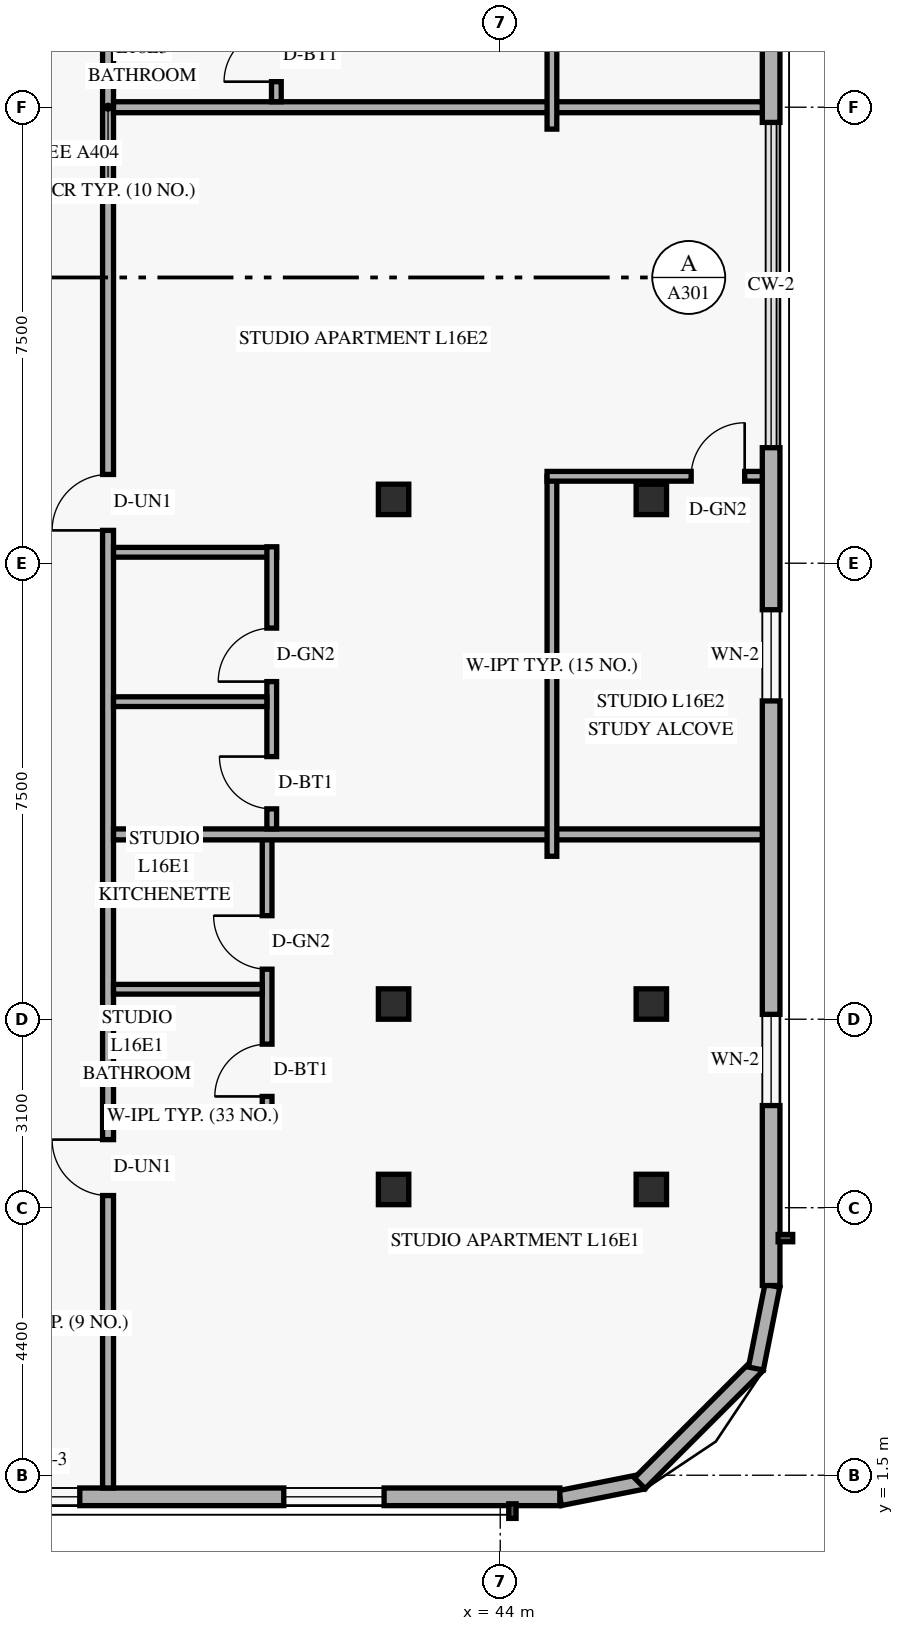
"""IFC4 building model, lengths in metres.
Left out: names, types, materials, properties, quantities, classifications, styles, units other than length and angle.
Written with IfcOpenShell. Run it as: python <this file> out.ifc"""

import sys

from ifc_helpers import new_model, si_unit, direction, frame, frame_2d, origin, origin_2d, place, context, subcontext, project, spatial, rectangle, hollow_rectangle, extrude, element, fill, save


model = new_model("IFC4")
c1 = context("Model", 3, precision=1e-05, world=origin(), true_north=direction((0.0, 1.0)))
c2 = subcontext(c1, "Body", "Model", "MODEL_VIEW")
j1 = project(units=[si_unit("LENGTHUNIT", "METRE"), si_unit("PLANEANGLEUNIT", "RADIAN")], contexts=[c1])
p1 = place(None, origin())
s1 = spatial("IfcSite", under=j1, at=p1, CompositionType="ELEMENT")
p2 = place(p1, origin())
s2 = spatial("IfcBuilding", under=s1, at=p2, CompositionType="ELEMENT")
p3 = place(p2, frame((0.0, 0.0, 64.2)))
s3 = spatial("IfcBuildingStorey", under=s2, at=p3, CompositionType="ELEMENT", Elevation=64.2)
for number, where, z_axis, x_axis in (
    (1, (42.183, 6.2, 0.0), (0.035, 0.0, 0.999), (0.0, 1.0, 0.0)),
    (2, (42.183, 9.25, 0.0), (0.035, 0.0, 0.999), (0.0, 1.0, 0.0)),
    (3, (42.183, 17.55, 0.0), (0.035, 0.0, 0.999), (0.0, 1.0, 0.0)),
):
    element("IfcColumn", number, at=place(p3, frame(where, z_axis=z_axis, x_axis=x_axis)), inside=s3, PredefinedType="COLUMN", context=c2, shape_type="SweptSolid", body=[
        extrude(hollow_rectangle(XDim=0.5, YDim=0.5, WallThickness=0.022, at=origin_2d()), origin(), (0.0, 0.0, 1.0), 3.602),
    ])
for number, where, z_axis, x_axis in (
    (4, (46.38, 6.2, 0.0), (0.058, 0.0, 0.998), (0.0, 1.0, 0.0)),
    (5, (46.38, 9.25, 0.0), (0.058, 0.0, 0.998), (0.0, 1.0, 0.0)),
    (6, (46.38, 17.55, 0.0), (0.058, 0.0, 0.998), (0.0, 1.0, 0.0)),
):
    element("IfcColumn", number, at=place(p3, frame(where, z_axis=z_axis, x_axis=x_axis)), inside=s3, PredefinedType="COLUMN", context=c2, shape_type="SweptSolid", body=[
        extrude(hollow_rectangle(XDim=0.5, YDim=0.5, WallThickness=0.022, at=origin_2d()), origin(), (0.0, 0.0, 1.0), 3.606),
    ])
p4 = place(p3, frame((44.983, 1.124, 0.0), z_axis=(0.0, 0.0, 1.0), x_axis=(0.980809899341, 0.19496651342, 0.0)))
e7 = element("IfcWall", 7, at=p4, inside=s3, PredefinedType="SOLIDWALL", context=c2, shape_type="SweptSolid", body=[
    extrude(rectangle(XDim=1.389, YDim=0.25, at=frame_2d((0.694, 0.0))), origin(), (0.0, 0.0, 1.0), 3.36),
])
p5 = place(p3, frame((46.295, 1.368, 0.0), z_axis=(0.0, 0.0, 1.0), x_axis=(0.707106781187, 0.707106781187, 0.0)))
e8 = element("IfcWall", 8, at=p5, inside=s3, PredefinedType="SOLIDWALL", context=c2, shape_type="SweptSolid", body=[
    extrude(rectangle(XDim=2.739, YDim=0.25, at=frame_2d((1.37, 0.0))), origin(), (0.0, 0.0, 1.0), 3.36),
])
p6 = place(p3, frame((48.205, 3.254, 0.0), z_axis=(0.0, 0.0, 1.0), x_axis=(0.19496651342, 0.980809899341, 0.0)))
e9 = element("IfcWall", 9, at=p6, inside=s3, PredefinedType="SOLIDWALL", context=c2, shape_type="SweptSolid", body=[
    extrude(rectangle(XDim=1.389, YDim=0.25, at=frame_2d((0.694, 0.0))), origin(), (0.0, 0.0, 1.0), 3.36),
])
p7 = place(p3, frame((5.42, 1.145, 0.0), z_axis=(0.0, 0.0, 1.0), x_axis=(1.0, 0.0, 0.0)))
e10 = element("IfcWall", 10, at=p7, inside=s3, PredefinedType="SOLIDWALL", context=c2, shape_type="SweptSolid", body=[
    extrude(rectangle(XDim=39.56, YDim=0.29, at=frame_2d((19.78, 0.0))), origin(), (0.0, 0.0, 1.0), 3.36),
])
p8 = place(p7, frame((2.615, 0.0, 0.85)))
e11 = element("IfcOpeningElement", 11, at=p8, cuts=e10, PredefinedType="OPENING", context=c2, shape_type="SweptSolid", body=[
    extrude(rectangle(XDim=1.65, YDim=1.6, at=frame_2d((0.825, 0.8))), frame((0.0, 0.155, 0.0), z_axis=(0.0, -1.0, 0.0), x_axis=(1.0, 0.0, 0.0)), (0.0, 0.0, 1.0), 0.31),
])
p9 = place(p7, frame((7.18, 0.0, 0.85)))
e12 = element("IfcOpeningElement", 12, at=p9, cuts=e10, PredefinedType="OPENING", context=c2, shape_type="SweptSolid", body=[
    extrude(rectangle(XDim=1.2, YDim=1.5, at=frame_2d((0.6, 0.75))), frame((0.0, 0.155, 0.0), z_axis=(0.0, -1.0, 0.0), x_axis=(1.0, 0.0, 0.0)), (0.0, 0.0, 1.0), 0.31),
])
p10 = place(p7, frame((11.906, 0.0, 0.85)))
e13 = element("IfcOpeningElement", 13, at=p10, cuts=e10, PredefinedType="OPENING", context=c2, shape_type="SweptSolid", body=[
    extrude(rectangle(XDim=1.65, YDim=1.6, at=frame_2d((0.825, 0.8))), frame((0.0, 0.155, 0.0), z_axis=(0.0, -1.0, 0.0), x_axis=(1.0, 0.0, 0.0)), (0.0, 0.0, 1.0), 0.31),
])
p11 = place(p7, frame((18.515, 0.0, 0.85)))
e14 = element("IfcOpeningElement", 14, at=p11, cuts=e10, PredefinedType="OPENING", context=c2, shape_type="SweptSolid", body=[
    extrude(rectangle(XDim=1.65, YDim=1.6, at=frame_2d((0.825, 0.8))), frame((0.0, 0.155, 0.0), z_axis=(0.0, -1.0, 0.0), x_axis=(1.0, 0.0, 0.0)), (0.0, 0.0, 1.0), 0.31),
])
p12 = place(p7, frame((25.124, 0.0, 0.85)))
e15 = element("IfcOpeningElement", 15, at=p12, cuts=e10, PredefinedType="OPENING", context=c2, shape_type="SweptSolid", body=[
    extrude(rectangle(XDim=1.65, YDim=1.6, at=frame_2d((0.825, 0.8))), frame((0.0, 0.155, 0.0), z_axis=(0.0, -1.0, 0.0), x_axis=(1.0, 0.0, 0.0)), (0.0, 0.0, 1.0), 0.31),
])
p13 = place(p7, frame((30.465, 0.0, 0.85)))
e16 = element("IfcOpeningElement", 16, at=p13, cuts=e10, PredefinedType="OPENING", context=c2, shape_type="SweptSolid", body=[
    extrude(rectangle(XDim=1.2, YDim=1.5, at=frame_2d((0.6, 0.75))), frame((0.0, 0.155, 0.0), z_axis=(0.0, -1.0, 0.0), x_axis=(1.0, 0.0, 0.0)), (0.0, 0.0, 1.0), 0.31),
])
p14 = place(p7, frame((35.02, 0.0, 0.85)))
e17 = element("IfcOpeningElement", 17, at=p14, cuts=e10, PredefinedType="OPENING", context=c2, shape_type="SweptSolid", body=[
    extrude(rectangle(XDim=1.65, YDim=1.6, at=frame_2d((0.825, 0.8))), frame((0.0, 0.155, 0.0), z_axis=(0.0, -1.0, 0.0), x_axis=(1.0, 0.0, 0.0)), (0.0, 0.0, 1.0), 0.31),
])
p15 = place(p3, frame((48.455, 4.62, 0.0), z_axis=(0.0, 0.0, 1.0), x_axis=(0.0, 1.0, 0.0)))
e18 = element("IfcWall", 18, at=p15, inside=s3, PredefinedType="SOLIDWALL", context=c2, shape_type="SweptSolid", body=[
    extrude(rectangle(XDim=13.78, YDim=0.29, at=frame_2d((6.89, 0.0))), origin(), (0.0, 0.0, 1.0), 3.36),
])
p16 = place(p15, frame((2.96, 0.0, 0.85)))
e19 = element("IfcOpeningElement", 19, at=p16, cuts=e18, PredefinedType="OPENING", context=c2, shape_type="SweptSolid", body=[
    extrude(rectangle(XDim=1.5, YDim=1.55, at=frame_2d((0.75, 0.775))), frame((0.0, 0.155, 0.0), z_axis=(0.0, -1.0, 0.0), x_axis=(1.0, 0.0, 0.0)), (0.0, 0.0, 1.0), 0.31),
])
p17 = place(p15, frame((9.615, 0.0, 0.85)))
e20 = element("IfcOpeningElement", 20, at=p17, cuts=e18, PredefinedType="OPENING", context=c2, shape_type="SweptSolid", body=[
    extrude(rectangle(XDim=1.5, YDim=1.55, at=frame_2d((0.75, 0.775))), frame((0.0, 0.155, 0.0), z_axis=(0.0, -1.0, 0.0), x_axis=(1.0, 0.0, 0.0)), (0.0, 0.0, 1.0), 0.31),
])
p18 = place(p3, frame((48.455, 23.75, 0.0), z_axis=(0.0, 0.0, 1.0), x_axis=(0.0, 1.0, 0.0)))
e21 = element("IfcWall", 21, at=p18, inside=s3, PredefinedType="SOLIDWALL", context=c2, shape_type="SweptSolid", body=[
    extrude(rectangle(XDim=19.63, YDim=0.29, at=frame_2d((9.815, 0.0))), origin(), (0.0, 0.0, 1.0), 3.36),
])
p19 = place(p18, frame((2.32, 0.0, 0.85)))
e22 = element("IfcOpeningElement", 22, at=p19, cuts=e21, PredefinedType="OPENING", context=c2, shape_type="SweptSolid", body=[
    extrude(rectangle(XDim=1.5, YDim=1.55, at=frame_2d((0.75, 0.775))), frame((0.0, 0.155, 0.0), z_axis=(0.0, -1.0, 0.0), x_axis=(1.0, 0.0, 0.0)), (0.0, 0.0, 1.0), 0.31),
])
p20 = place(p18, frame((8.425, 0.0, 0.85)))
e23 = element("IfcOpeningElement", 23, at=p20, cuts=e21, PredefinedType="OPENING", context=c2, shape_type="SweptSolid", body=[
    extrude(rectangle(XDim=1.5, YDim=1.55, at=frame_2d((0.75, 0.775))), frame((0.0, 0.155, 0.0), z_axis=(0.0, -1.0, 0.0), x_axis=(1.0, 0.0, 0.0)), (0.0, 0.0, 1.0), 0.31),
])
p21 = place(p18, frame((15.17, 0.0, 0.85)))
e24 = element("IfcOpeningElement", 24, at=p21, cuts=e21, PredefinedType="OPENING", context=c2, shape_type="SweptSolid", body=[
    extrude(rectangle(XDim=1.5, YDim=1.55, at=frame_2d((0.75, 0.775))), frame((0.0, 0.155, 0.0), z_axis=(0.0, -1.0, 0.0), x_axis=(1.0, 0.0, 0.0)), (0.0, 0.0, 1.0), 0.31),
])
p22 = place(p3, frame((37.55, 1.29, 0.0), z_axis=(0.0, 0.0, 1.0), x_axis=(0.0, 1.0, 0.0)))
e25 = element("IfcWall", 25, at=p22, inside=s3, PredefinedType="STANDARD", context=c2, shape_type="SweptSolid", body=[
    extrude(rectangle(XDim=45.42, YDim=0.18, at=frame_2d((22.71, 0.0))), origin(), (0.0, 0.0, 1.0), 2.649),
])
p23 = place(p22, frame((4.81, 0.0, 0.0)))
e26 = element("IfcOpeningElement", 26, at=p23, cuts=e25, PredefinedType="OPENING", context=c2, shape_type="SweptSolid", body=[
    extrude(rectangle(XDim=0.92, YDim=2.15, at=frame_2d((0.46, 1.075))), frame((0.0, 0.1, 0.0), z_axis=(0.0, -1.0, 0.0), x_axis=(1.0, 0.0, 0.0)), (0.0, 0.0, 1.0), 0.2),
])
p24 = place(p22, frame((15.75, 0.0, 0.0)))
e27 = element("IfcOpeningElement", 27, at=p24, cuts=e25, PredefinedType="OPENING", context=c2, shape_type="SweptSolid", body=[
    extrude(rectangle(XDim=0.92, YDim=2.15, at=frame_2d((0.46, 1.075))), frame((0.0, 0.1, 0.0), z_axis=(0.0, -1.0, 0.0), x_axis=(1.0, 0.0, 0.0)), (0.0, 0.0, 1.0), 0.2),
])
p25 = place(p22, frame((27.71, 0.0, 0.0)))
e28 = element("IfcOpeningElement", 28, at=p25, cuts=e25, PredefinedType="OPENING", context=c2, shape_type="SweptSolid", body=[
    extrude(rectangle(XDim=0.92, YDim=2.15, at=frame_2d((0.46, 1.075))), frame((0.0, 0.1, 0.0), z_axis=(0.0, -1.0, 0.0), x_axis=(1.0, 0.0, 0.0)), (0.0, 0.0, 1.0), 0.2),
])
p26 = place(p22, frame((36.422, 0.0, 0.0)))
e29 = element("IfcOpeningElement", 29, at=p26, cuts=e25, PredefinedType="OPENING", context=c2, shape_type="SweptSolid", body=[
    extrude(rectangle(XDim=0.92, YDim=2.15, at=frame_2d((0.46, 1.075))), frame((0.0, 0.1, 0.0), z_axis=(0.0, -1.0, 0.0), x_axis=(1.0, 0.0, 0.0)), (0.0, 0.0, 1.0), 0.2),
])
p27 = place(p3, frame((37.64, 7.4, 0.0), z_axis=(0.0, 0.0, 1.0), x_axis=(1.0, 0.0, 0.0)))
e30 = element("IfcWall", 30, at=p27, inside=s3, PredefinedType="PLUMBINGWALL", context=c2, shape_type="SweptSolid", body=[
    extrude(rectangle(XDim=2.606, YDim=0.16, at=frame_2d((1.303, 0.0))), origin(), (0.0, 0.0, 1.0), 3.36),
])
p28 = place(p3, frame((40.166, 7.31, 0.0), z_axis=(0.0, 0.0, 1.0), x_axis=(0.0, 1.0, 0.0)))
e31 = element("IfcWall", 31, at=p28, inside=s3, PredefinedType="PLUMBINGWALL", context=c2, shape_type="SweptSolid", body=[
    extrude(rectangle(XDim=4.73, YDim=0.16, at=frame_2d((2.365, 0.0))), origin(), (0.0, 0.0, 1.0), 2.649),
])
p29 = place(p28, frame((0.42, 0.0, 0.0)))
e32 = element("IfcOpeningElement", 32, at=p29, cuts=e31, PredefinedType="OPENING", context=c2, shape_type="SweptSolid", body=[
    extrude(rectangle(XDim=0.86, YDim=2.12, at=frame_2d((0.43, 1.06))), frame((0.0, 0.09, 0.0), z_axis=(0.0, -1.0, 0.0), x_axis=(1.0, 0.0, 0.0)), (0.0, 0.0, 1.0), 0.18),
])
p30 = place(p28, frame((2.513, 0.0, 0.0)))
e33 = element("IfcOpeningElement", 33, at=p30, cuts=e31, PredefinedType="OPENING", context=c2, shape_type="SweptSolid", body=[
    extrude(rectangle(XDim=0.88, YDim=2.12, at=frame_2d((0.44, 1.06))), frame((0.0, 0.09, 0.0), z_axis=(0.0, -1.0, 0.0), x_axis=(1.0, 0.0, 0.0)), (0.0, 0.0, 1.0), 0.18),
])
p31 = place(p3, frame((37.64, 9.493, 0.0), z_axis=(0.0, 0.0, 1.0), x_axis=(1.0, 0.0, 0.0)))
e34 = element("IfcWall", 34, at=p31, inside=s3, PredefinedType="PLUMBINGWALL", context=c2, shape_type="SweptSolid", body=[
    extrude(rectangle(XDim=2.446, YDim=0.16, at=frame_2d((1.223, 0.0))), origin(), (0.0, 0.0, 1.0), 3.36),
])
p32 = place(p3, frame((37.64, 12.04, 0.0), z_axis=(0.0, 0.0, 1.0), x_axis=(1.0, 0.0, 0.0)))
e35 = element("IfcWall", 35, at=p32, inside=s3, PredefinedType="PARTITIONING", context=c2, shape_type="SweptSolid", body=[
    extrude(rectangle(XDim=10.67, YDim=0.18, at=frame_2d((5.335, 0.0))), origin(), (0.0, 0.0, 1.0), 2.649),
])
p33 = place(p3, frame((37.64, 16.68, 0.0), z_axis=(0.0, 0.0, 1.0), x_axis=(1.0, 0.0, 0.0)))
e36 = element("IfcWall", 36, at=p33, inside=s3, PredefinedType="PLUMBINGWALL", context=c2, shape_type="SweptSolid", body=[
    extrude(rectangle(XDim=2.682, YDim=0.16, at=frame_2d((1.341, 0.0))), origin(), (0.0, 0.0, 1.0), 3.36),
])
p34 = place(p3, frame((40.242, 12.13, 0.0), z_axis=(0.0, 0.0, 1.0), x_axis=(0.0, 1.0, 0.0)))
e37 = element("IfcWall", 37, at=p34, inside=s3, PredefinedType="PLUMBINGWALL", context=c2, shape_type="SweptSolid", body=[
    extrude(rectangle(XDim=4.64, YDim=0.16, at=frame_2d((2.32, 0.0))), origin(), (0.0, 0.0, 1.0), 2.932),
])
p35 = place(p34, frame((0.33, 0.0, 0.0)))
e38 = element("IfcOpeningElement", 38, at=p35, cuts=e37, PredefinedType="OPENING", context=c2, shape_type="SweptSolid", body=[
    extrude(rectangle(XDim=0.86, YDim=2.12, at=frame_2d((0.43, 1.06))), frame((0.0, 0.09, 0.0), z_axis=(0.0, -1.0, 0.0), x_axis=(1.0, 0.0, 0.0)), (0.0, 0.0, 1.0), 0.18),
])
p36 = place(p34, frame((2.423, 0.0, 0.0)))
e39 = element("IfcOpeningElement", 39, at=p36, cuts=e37, PredefinedType="OPENING", context=c2, shape_type="SweptSolid", body=[
    extrude(rectangle(XDim=0.88, YDim=2.12, at=frame_2d((0.44, 1.06))), frame((0.0, 0.09, 0.0), z_axis=(0.0, -1.0, 0.0), x_axis=(1.0, 0.0, 0.0)), (0.0, 0.0, 1.0), 0.18),
])
p37 = place(p3, frame((37.64, 14.223, 0.0), z_axis=(0.0, 0.0, 1.0), x_axis=(1.0, 0.0, 0.0)))
e40 = element("IfcWall", 40, at=p37, inside=s3, PredefinedType="PLUMBINGWALL", context=c2, shape_type="SweptSolid", body=[
    extrude(rectangle(XDim=2.522, YDim=0.16, at=frame_2d((1.261, 0.0))), origin(), (0.0, 0.0, 1.0), 3.36),
])
p38 = place(p3, frame((44.85, 11.68, 0.0), z_axis=(0.0, 0.0, 1.0), x_axis=(0.0, 1.0, 0.0)))
e41 = element("IfcWall", 41, at=p38, inside=s3, PredefinedType="PARTITIONING", context=c2, shape_type="SweptSolid", body=[
    extrude(rectangle(XDim=6.25, YDim=0.16, at=frame_2d((3.125, 0.0))), origin(), (0.0, 0.0, 1.0), 2.649),
])
p39 = place(p3, frame((44.77, 17.93, 0.0), z_axis=(0.0, 0.0, 1.0), x_axis=(1.0, 0.0, 0.0)))
e42 = element("IfcWall", 42, at=p39, inside=s3, PredefinedType="PARTITIONING", context=c2, shape_type="SweptSolid", body=[
    extrude(rectangle(XDim=3.54, YDim=0.16, at=frame_2d((1.77, 0.0))), origin(), (0.0, 0.0, 1.0), 2.809),
])
p40 = place(p39, frame((2.37, 0.0, 0.0)))
e43 = element("IfcOpeningElement", 43, at=p40, cuts=e42, PredefinedType="OPENING", context=c2, shape_type="SweptSolid", body=[
    extrude(rectangle(XDim=0.88, YDim=2.12, at=frame_2d((0.44, 1.06))), frame((0.0, 0.09, 0.0), z_axis=(0.0, -1.0, 0.0), x_axis=(1.0, 0.0, 0.0)), (0.0, 0.0, 1.0), 0.18),
])
p41 = place(p3, frame((37.64, 24.0, 0.0), z_axis=(0.0, 0.0, 1.0), x_axis=(1.0, 0.0, 0.0)))
e44 = element("IfcWall", 44, at=p41, inside=s3, PredefinedType="PARTITIONING", context=c2, shape_type="SweptSolid", body=[
    extrude(rectangle(XDim=10.67, YDim=0.18, at=frame_2d((5.335, 0.0))), origin(), (0.0, 0.0, 1.0), 2.649),
])
p42 = place(p3, frame((40.318, 24.09, 0.0), z_axis=(0.0, 0.0, 1.0), x_axis=(0.0, 1.0, 0.0)))
e45 = element("IfcWall", 45, at=p42, inside=s3, PredefinedType="PLUMBINGWALL", context=c2, shape_type="SweptSolid", body=[
    extrude(rectangle(XDim=4.64, YDim=0.16, at=frame_2d((2.32, 0.0))), origin(), (0.0, 0.0, 1.0), 2.932),
])
p43 = place(p42, frame((0.33, 0.0, 0.0)))
e46 = element("IfcOpeningElement", 46, at=p43, cuts=e45, PredefinedType="OPENING", context=c2, shape_type="SweptSolid", body=[
    extrude(rectangle(XDim=0.86, YDim=2.12, at=frame_2d((0.43, 1.06))), frame((0.0, 0.09, 0.0), z_axis=(0.0, -1.0, 0.0), x_axis=(1.0, 0.0, 0.0)), (0.0, 0.0, 1.0), 0.18),
])
p44 = place(p42, frame((2.423, 0.0, 0.0)))
e47 = element("IfcOpeningElement", 47, at=p44, cuts=e45, PredefinedType="OPENING", context=c2, shape_type="SweptSolid", body=[
    extrude(rectangle(XDim=0.88, YDim=2.12, at=frame_2d((0.44, 1.06))), frame((0.0, 0.09, 0.0), z_axis=(0.0, -1.0, 0.0), x_axis=(1.0, 0.0, 0.0)), (0.0, 0.0, 1.0), 0.18),
])
p45 = place(p3, frame((44.85, 23.64, 0.0), z_axis=(0.0, 0.0, 1.0), x_axis=(0.0, 1.0, 0.0)))
e48 = element("IfcWall", 48, at=p45, inside=s3, PredefinedType="PARTITIONING", context=c2, shape_type="SweptSolid", body=[
    extrude(rectangle(XDim=6.25, YDim=0.16, at=frame_2d((3.125, 0.0))), origin(), (0.0, 0.0, 1.0), 2.932),
])
p46 = place(p13, origin())
e49 = element("IfcWindow", 49, at=p46, inside=s3, PartitioningType="SINGLE_PANEL", PredefinedType="WINDOW", context=c2, shape_type="SweptSolid", body=[
    extrude(rectangle(XDim=1.2, YDim=1.5, at=frame_2d((0.6, 0.75))), frame((0.0, 0.03, 0.0), z_axis=(0.0, -1.0, 0.0), x_axis=(1.0, 0.0, 0.0)), (0.0, 0.0, 1.0), 0.06),
])
fill(e16, e49)
p47 = place(p14, origin())
e50 = element("IfcWindow", 50, at=p47, inside=s3, PartitioningType="SINGLE_PANEL", PredefinedType="WINDOW", context=c2, shape_type="SweptSolid", body=[
    extrude(rectangle(XDim=1.65, YDim=1.6, at=frame_2d((0.825, 0.8))), frame((0.0, 0.03, 0.0), z_axis=(0.0, -1.0, 0.0), x_axis=(1.0, 0.0, 0.0)), (0.0, 0.0, 1.0), 0.06),
])
fill(e17, e50)
p48 = place(p16, origin())
e51 = element("IfcWindow", 51, at=p48, inside=s3, PartitioningType="SINGLE_PANEL", PredefinedType="WINDOW", context=c2, shape_type="SweptSolid", body=[
    extrude(rectangle(XDim=1.5, YDim=1.55, at=frame_2d((0.75, 0.775))), frame((0.0, 0.03, 0.0), z_axis=(0.0, -1.0, 0.0), x_axis=(1.0, 0.0, 0.0)), (0.0, 0.0, 1.0), 0.06),
])
fill(e19, e51)
p49 = place(p17, origin())
e52 = element("IfcWindow", 52, at=p49, inside=s3, PartitioningType="SINGLE_PANEL", PredefinedType="WINDOW", context=c2, shape_type="SweptSolid", body=[
    extrude(rectangle(XDim=1.5, YDim=1.55, at=frame_2d((0.75, 0.775))), frame((0.0, 0.03, 0.0), z_axis=(0.0, -1.0, 0.0), x_axis=(1.0, 0.0, 0.0)), (0.0, 0.0, 1.0), 0.06),
])
fill(e20, e52)
p50 = place(p23, origin())
e53 = element("IfcDoor", 53, at=p50, inside=s3, OperationType="SINGLE_SWING_RIGHT", PredefinedType="DOOR", context=c2, shape_type="SweptSolid", body=[
    extrude(rectangle(XDim=0.92, YDim=2.15, at=frame_2d((0.46, 1.075))), frame((0.0, 0.025, 0.0), z_axis=(0.0, -1.0, 0.0), x_axis=(1.0, 0.0, 0.0)), (0.0, 0.0, 1.0), 0.05),
])
fill(e26, e53)
p51 = place(p29, origin())
e54 = element("IfcDoor", 54, at=p51, inside=s3, OperationType="SINGLE_SWING_LEFT", PredefinedType="DOOR", context=c2, shape_type="SweptSolid", body=[
    extrude(rectangle(XDim=0.86, YDim=2.12, at=frame_2d((0.43, 1.06))), frame((0.0, 0.025, 0.0), z_axis=(0.0, -1.0, 0.0), x_axis=(1.0, 0.0, 0.0)), (0.0, 0.0, 1.0), 0.05),
])
fill(e32, e54)
p52 = place(p30, origin())
e55 = element("IfcDoor", 55, at=p52, inside=s3, OperationType="SINGLE_SWING_RIGHT", PredefinedType="DOOR", context=c2, shape_type="SweptSolid", body=[
    extrude(rectangle(XDim=0.88, YDim=2.12, at=frame_2d((0.44, 1.06))), frame((0.0, 0.025, 0.0), z_axis=(0.0, -1.0, 0.0), x_axis=(1.0, 0.0, 0.0)), (0.0, 0.0, 1.0), 0.05),
])
fill(e33, e55)
p53 = place(p40, origin())
e56 = element("IfcDoor", 56, at=p53, inside=s3, OperationType="SINGLE_SWING_RIGHT", PredefinedType="DOOR", context=c2, shape_type="SweptSolid", body=[
    extrude(rectangle(XDim=0.88, YDim=2.12, at=frame_2d((0.44, 1.06))), frame((0.0, 0.025, 0.0), z_axis=(0.0, -1.0, 0.0), x_axis=(1.0, 0.0, 0.0)), (0.0, 0.0, 1.0), 0.05),
])
fill(e43, e56)
p54 = place(p24, origin())
e57 = element("IfcDoor", 57, at=p54, inside=s3, OperationType="SINGLE_SWING_LEFT", PredefinedType="DOOR", context=c2, shape_type="SweptSolid", body=[
    extrude(rectangle(XDim=0.92, YDim=2.15, at=frame_2d((0.46, 1.075))), frame((0.0, 0.025, 0.0), z_axis=(0.0, -1.0, 0.0), x_axis=(1.0, 0.0, 0.0)), (0.0, 0.0, 1.0), 0.05),
])
fill(e27, e57)
p55 = place(p35, origin())
e58 = element("IfcDoor", 58, at=p55, inside=s3, OperationType="SINGLE_SWING_RIGHT", PredefinedType="DOOR", context=c2, shape_type="SweptSolid", body=[
    extrude(rectangle(XDim=0.86, YDim=2.12, at=frame_2d((0.43, 1.06))), frame((0.0, 0.025, 0.0), z_axis=(0.0, -1.0, 0.0), x_axis=(1.0, 0.0, 0.0)), (0.0, 0.0, 1.0), 0.05),
])
fill(e38, e58)
p56 = place(p36, origin())
e59 = element("IfcDoor", 59, at=p56, inside=s3, OperationType="SINGLE_SWING_LEFT", PredefinedType="DOOR", context=c2, shape_type="SweptSolid", body=[
    extrude(rectangle(XDim=0.88, YDim=2.12, at=frame_2d((0.44, 1.06))), frame((0.0, 0.025, 0.0), z_axis=(0.0, -1.0, 0.0), x_axis=(1.0, 0.0, 0.0)), (0.0, 0.0, 1.0), 0.05),
])
fill(e39, e59)
p57 = place(p43, origin())
e60 = element("IfcDoor", 60, at=p57, inside=s3, OperationType="SINGLE_SWING_LEFT", PredefinedType="DOOR", context=c2, shape_type="SweptSolid", body=[
    extrude(rectangle(XDim=0.86, YDim=2.12, at=frame_2d((0.43, 1.06))), frame((0.0, 0.025, 0.0), z_axis=(0.0, -1.0, 0.0), x_axis=(1.0, 0.0, 0.0)), (0.0, 0.0, 1.0), 0.05),
])
fill(e46, e60)
save(model, sys.argv[1])
